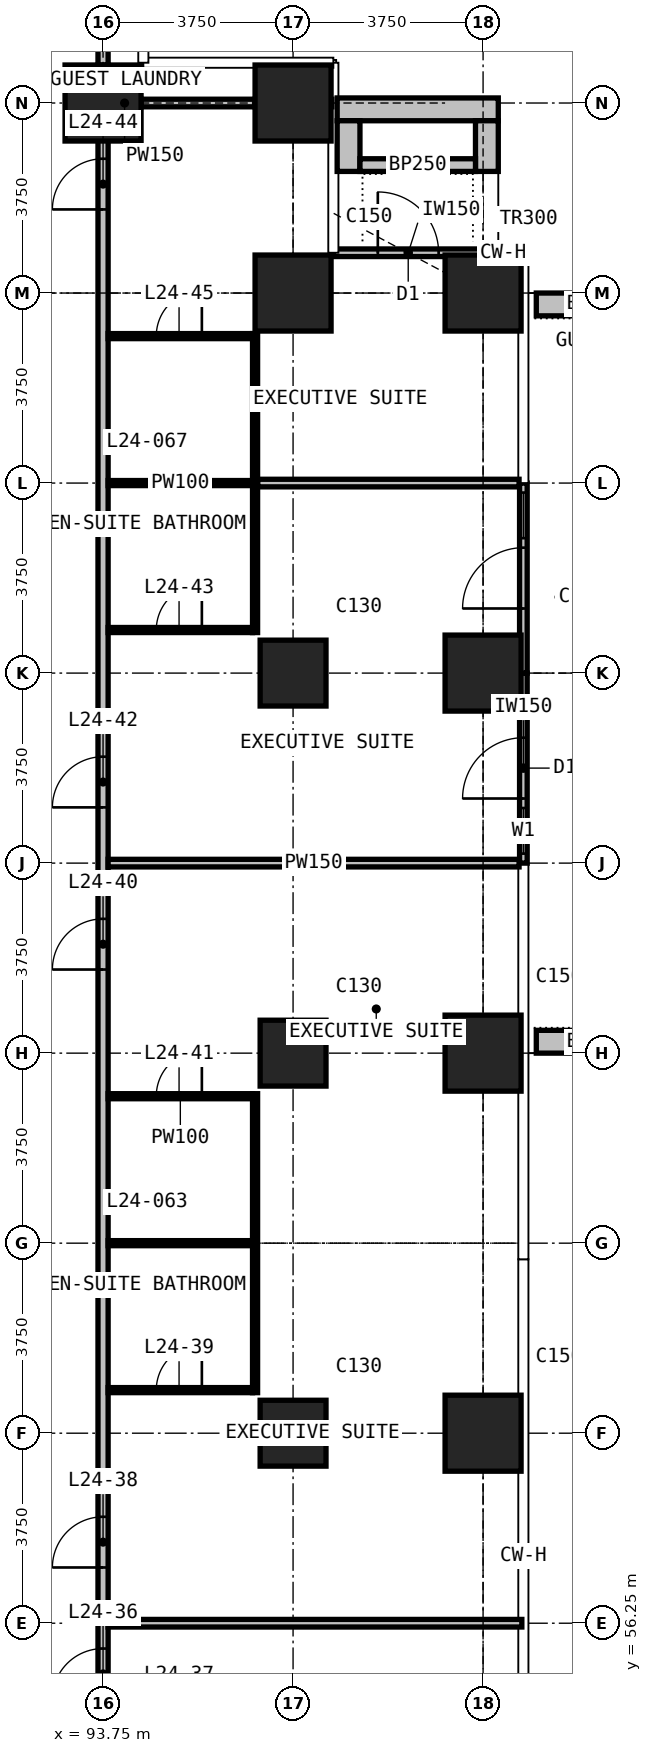
"""IFC4 building model, lengths in metres.
Left out: names, types, materials, properties, quantities, classifications, styles, units other than length and angle.
Written with IfcOpenShell. Run it as: python <this file> out.ifc"""

import sys

from ifc_helpers import new_model, si_unit, direction, frame, frame_2d, origin, origin_2d, place, context, subcontext, project, spatial, rectangle, extrude, element, fill, save


model = new_model("IFC4")
c1 = context("Model", 3, precision=1e-05, world=origin(), true_north=direction((0.0, 1.0)))
c2 = subcontext(c1, "Body", "Model", "MODEL_VIEW")
j1 = project(units=[si_unit("LENGTHUNIT", "METRE"), si_unit("PLANEANGLEUNIT", "RADIAN")], contexts=[c1])
p1 = place(None, origin())
s1 = spatial("IfcSite", under=j1, at=p1, CompositionType="ELEMENT")
p2 = place(p1, origin())
s2 = spatial("IfcBuilding", under=s1, at=p2, CompositionType="ELEMENT")
p3 = place(p2, frame((0.0, 0.0, 98.9)))
s3 = spatial("IfcBuildingStorey", under=s2, at=p3, CompositionType="ELEMENT", Elevation=98.9)
p4 = place(p3, frame((93.75, 86.25, 0.0), z_axis=(0.0, 0.0, 1.0), x_axis=(1.0, 0.0, 0.0)))
e1 = element("IfcColumn", 1, at=p4, inside=s3, PredefinedType="COLUMN", context=c2, shape_type="SweptSolid", body=[
    extrude(rectangle(XDim=1.5, YDim=1.5, at=origin_2d()), origin(), (0.0, 0.0, 1.0), 3.3),
])
for number, where, z_axis, x_axis in (
    (2, (97.5, 60.0, 0.0), (0.0, 0.0, 1.0), (1.0, 0.0, 0.0)),
    (3, (97.5, 67.5, 0.0), (0.0, 0.0, 1.0), (1.0, 0.0, 0.0)),
    (4, (97.5, 75.0, 0.0), (0.0, 0.0, 1.0), (1.0, 0.0, 0.0)),
):
    element("IfcColumn", number, at=place(p3, frame(where, z_axis=z_axis, x_axis=x_axis)), inside=s3, PredefinedType="COLUMN", context=c2, shape_type="SweptSolid", body=[
        extrude(rectangle(XDim=1.3, YDim=1.3, at=origin_2d()), origin(), (0.0, 0.0, 1.0), 3.3),
    ])
for number, where, z_axis, x_axis in (
    (5, (97.5, 82.5, 0.0), (0.0, 0.0, 1.0), (1.0, 0.0, 0.0)),
    (6, (97.5, 86.25, 0.0), (0.0, 0.0, 1.0), (1.0, 0.0, 0.0)),
    (7, (101.25, 60.0, 0.0), (0.0, 0.0, 1.0), (1.0, 0.0, 0.0)),
    (8, (101.25, 67.5, 0.0), (0.0, 0.0, 1.0), (1.0, 0.0, 0.0)),
    (9, (101.25, 75.0, 0.0), (0.0, 0.0, 1.0), (1.0, 0.0, 0.0)),
    (10, (101.25, 82.5, 0.0), (0.0, 0.0, 1.0), (1.0, 0.0, 0.0)),
):
    element("IfcColumn", number, at=place(p3, frame(where, z_axis=z_axis, x_axis=x_axis)), inside=s3, PredefinedType="COLUMN", context=c2, shape_type="SweptSolid", body=[
        extrude(rectangle(XDim=1.5, YDim=1.5, at=origin_2d()), origin(), (0.0, 0.0, 1.0), 3.3),
    ])
p5 = place(p3, frame((102.045, 71.25, 0.0), z_axis=(0.0, 0.0, 1.0), x_axis=(0.0, 1.0, 0.0)))
e11 = element("IfcWall", 11, at=p5, inside=s3, PredefinedType="SOLIDWALL", context=c2, shape_type="SweptSolid", body=[
    extrude(rectangle(XDim=3.75, YDim=0.15, at=frame_2d((1.875, 0.0))), origin(), (0.0, 0.0, 1.0), 2.95),
])
p6 = place(p5, frame((0.188, 0.0, 0.1)))
e12 = element("IfcOpeningElement", 12, at=p6, cuts=e11, PredefinedType="OPENING", context=c2, shape_type="SweptSolid", body=[
    extrude(rectangle(XDim=0.9, YDim=2.4, at=frame_2d((0.45, 1.2))), frame((0.0, 0.085, 0.0), z_axis=(0.0, -1.0, 0.0), x_axis=(1.0, 0.0, 0.0)), (0.0, 0.0, 1.0), 0.17),
])
p7 = place(p5, frame((1.275, 0.0, 0.0)))
e13 = element("IfcOpeningElement", 13, at=p7, cuts=e11, PredefinedType="OPENING", context=c2, shape_type="SweptSolid", body=[
    extrude(rectangle(XDim=1.2, YDim=2.4, at=frame_2d((0.6, 1.2))), frame((0.0, 0.085, 0.0), z_axis=(0.0, -1.0, 0.0), x_axis=(1.0, 0.0, 0.0)), (0.0, 0.0, 1.0), 0.17),
])
p8 = place(p3, frame((102.045, 75.0, 0.0), z_axis=(0.0, 0.0, 1.0), x_axis=(0.0, 1.0, 0.0)))
e14 = element("IfcWall", 14, at=p8, inside=s3, PredefinedType="SOLIDWALL", context=c2, shape_type="SweptSolid", body=[
    extrude(rectangle(XDim=3.75, YDim=0.15, at=frame_2d((1.875, 0.0))), origin(), (0.0, 0.0, 1.0), 2.95),
])
p9 = place(p8, frame((1.275, 0.0, 0.0)))
e15 = element("IfcOpeningElement", 15, at=p9, cuts=e14, PredefinedType="OPENING", context=c2, shape_type="SweptSolid", body=[
    extrude(rectangle(XDim=1.2, YDim=2.4, at=frame_2d((0.6, 1.2))), frame((0.0, 0.085, 0.0), z_axis=(0.0, -1.0, 0.0), x_axis=(1.0, 0.0, 0.0)), (0.0, 0.0, 1.0), 0.17),
])
p10 = place(p8, frame((2.663, 0.0, 0.1)))
e16 = element("IfcOpeningElement", 16, at=p10, cuts=e14, PredefinedType="OPENING", context=c2, shape_type="SweptSolid", body=[
    extrude(rectangle(XDim=0.9, YDim=2.4, at=frame_2d((0.45, 1.2))), frame((0.0, 0.085, 0.0), z_axis=(0.0, -1.0, 0.0), x_axis=(1.0, 0.0, 0.0)), (0.0, 0.0, 1.0), 0.17),
])
p11 = place(p3, frame((98.295, 83.295, 0.0), z_axis=(0.0, 0.0, 1.0), x_axis=(1.0, 0.0, 0.0)))
e17 = element("IfcWall", 17, at=p11, inside=s3, PredefinedType="SOLIDWALL", context=c2, shape_type="SweptSolid", body=[
    extrude(rectangle(XDim=2.955, YDim=0.15, at=frame_2d((1.478, 0.0))), origin(), (0.0, 0.0, 1.0), 2.95),
])
p12 = place(p11, frame((0.877, 0.0, 0.0)))
e18 = element("IfcOpeningElement", 18, at=p12, cuts=e17, PredefinedType="OPENING", context=c2, shape_type="SweptSolid", body=[
    extrude(rectangle(XDim=1.2, YDim=2.4, at=frame_2d((0.6, 1.2))), frame((0.0, 0.085, 0.0), z_axis=(0.0, -1.0, 0.0), x_axis=(1.0, 0.0, 0.0)), (0.0, 0.0, 1.0), 0.17),
])
for number, where, z_axis, x_axis in (
    (19, (102.3, 67.725, 0.0), (0.0, 0.0, 1.0), (1.0, 0.0, 0.0)),
    (20, (102.3, 82.275, 0.0), (0.0, 0.0, 1.0), (1.0, 0.0, 0.0)),
):
    element("IfcWall", number, at=place(p3, frame(where, z_axis=z_axis, x_axis=x_axis)), inside=s3, PredefinedType="USERDEFINED", context=c2, shape_type="SweptSolid", body=[
        extrude(rectangle(XDim=2.35, YDim=0.45, at=frame_2d((1.175, 0.0))), origin(), (0.0, 0.0, 1.0), 1.1),
    ])
p13 = place(p3, frame((98.37, 86.125, 0.0), z_axis=(0.0, 0.0, 1.0), x_axis=(1.0, 0.0, 0.0)))
e21 = element("IfcWall", 21, at=p13, inside=s3, PredefinedType="USERDEFINED", context=c2, shape_type="SweptSolid", body=[
    extrude(rectangle(XDim=3.18, YDim=0.45, at=frame_2d((1.59, 0.0))), origin(), (0.0, 0.0, 1.0), 1.1),
])
for number, where, z_axis, x_axis in (
    (22, (98.595, 84.9, 0.0), (0.0, 0.0, 1.0), (0.0, 1.0, 0.0)),
    (23, (101.325, 84.9, 0.0), (0.0, 0.0, 1.0), (0.0, 1.0, 0.0)),
):
    element("IfcWall", number, at=place(p3, frame(where, z_axis=z_axis, x_axis=x_axis)), inside=s3, PredefinedType="USERDEFINED", context=c2, shape_type="SweptSolid", body=[
        extrude(rectangle(XDim=1.0, YDim=0.45, at=frame_2d((0.5, 0.0))), origin(), (0.0, 0.0, 1.0), 1.1),
    ])
p14 = place(p3, frame((98.82, 85.025, 0.0), z_axis=(0.0, 0.0, 1.0), x_axis=(1.0, 0.0, 0.0)))
e24 = element("IfcWall", 24, at=p14, inside=s3, PredefinedType="USERDEFINED", context=c2, shape_type="SweptSolid", body=[
    extrude(rectangle(XDim=2.28, YDim=0.25, at=frame_2d((1.14, 0.0))), origin(), (0.0, 0.0, 1.0), 1.0),
])
p15 = place(p3, frame((93.75, 52.4, 0.0), z_axis=(0.0, 0.0, 1.0), x_axis=(0.0, 1.0, 0.0)))
e25 = element("IfcWall", 25, at=p15, inside=s3, PredefinedType="PARTITIONING", context=c2, shape_type="SweptSolid", body=[
    extrude(rectangle(XDim=34.6, YDim=0.2, at=frame_2d((17.3, 0.0))), origin(), (0.0, 0.0, 1.0), 2.95),
])
p16 = place(p15, frame((2.35, 0.0, 0.0)))
e26 = element("IfcOpeningElement", 26, at=p16, cuts=e25, PredefinedType="OPENING", context=c2, shape_type="SweptSolid", body=[
    extrude(rectangle(XDim=1.0, YDim=2.1, at=frame_2d((0.5, 1.05))), frame((0.0, 0.11, 0.0), z_axis=(0.0, -1.0, 0.0), x_axis=(1.0, 0.0, 0.0)), (0.0, 0.0, 1.0), 0.22),
])
p17 = place(p15, frame((4.95, 0.0, 0.0)))
e27 = element("IfcOpeningElement", 27, at=p17, cuts=e25, PredefinedType="OPENING", context=c2, shape_type="SweptSolid", body=[
    extrude(rectangle(XDim=1.0, YDim=2.2, at=frame_2d((0.5, 1.1))), frame((0.0, 0.11, 0.0), z_axis=(0.0, -1.0, 0.0), x_axis=(1.0, 0.0, 0.0)), (0.0, 0.0, 1.0), 0.22),
])
p18 = place(p15, frame((16.75, 0.0, 0.0)))
e28 = element("IfcOpeningElement", 28, at=p18, cuts=e25, PredefinedType="OPENING", context=c2, shape_type="SweptSolid", body=[
    extrude(rectangle(XDim=1.0, YDim=2.2, at=frame_2d((0.5, 1.1))), frame((0.0, 0.11, 0.0), z_axis=(0.0, -1.0, 0.0), x_axis=(1.0, 0.0, 0.0)), (0.0, 0.0, 1.0), 0.22),
])
p19 = place(p15, frame((19.95, 0.0, 0.0)))
e29 = element("IfcOpeningElement", 29, at=p19, cuts=e25, PredefinedType="OPENING", context=c2, shape_type="SweptSolid", body=[
    extrude(rectangle(XDim=1.0, YDim=2.2, at=frame_2d((0.5, 1.1))), frame((0.0, 0.11, 0.0), z_axis=(0.0, -1.0, 0.0), x_axis=(1.0, 0.0, 0.0)), (0.0, 0.0, 1.0), 0.22),
])
p20 = place(p15, frame((31.75, 0.0, 0.0)))
e30 = element("IfcOpeningElement", 30, at=p20, cuts=e25, PredefinedType="OPENING", context=c2, shape_type="SweptSolid", body=[
    extrude(rectangle(XDim=1.0, YDim=2.2, at=frame_2d((0.5, 1.1))), frame((0.0, 0.11, 0.0), z_axis=(0.0, -1.0, 0.0), x_axis=(1.0, 0.0, 0.0)), (0.0, 0.0, 1.0), 0.22),
])
p21 = place(p3, frame((93.75, 87.0, 0.0), z_axis=(0.0, 0.0, 1.0), x_axis=(0.0, 1.0, 0.0)))
e31 = element("IfcWall", 31, at=p21, inside=s3, PredefinedType="PARTITIONING", context=c2, shape_type="SweptSolid", body=[
    extrude(rectangle(XDim=2.25, YDim=0.2, at=frame_2d((1.125, 0.0))), origin(), (0.0, 0.0, 1.0), 2.15),
])
p22 = place(p21, frame((1.05, 0.0, 0.0)))
e32 = element("IfcOpeningElement", 32, at=p22, cuts=e31, PredefinedType="OPENING", context=c2, shape_type="SweptSolid", body=[
    extrude(rectangle(XDim=0.9, YDim=2.1, at=frame_2d((0.45, 1.05))), frame((0.0, 0.11, 0.0), z_axis=(0.0, -1.0, 0.0), x_axis=(1.0, 0.0, 0.0)), (0.0, 0.0, 1.0), 0.22),
])
p23 = place(p3, frame((93.85, 56.25, 0.0), z_axis=(0.0, 0.0, 1.0), x_axis=(1.0, 0.0, 0.0)))
e33 = element("IfcWall", 33, at=p23, inside=s3, PredefinedType="PARTITIONING", context=c2, shape_type="SweptSolid", body=[
    extrude(rectangle(XDim=8.165, YDim=0.15, at=frame_2d((4.083, 0.0))), origin(), (0.0, 0.0, 1.0), 2.95),
])
p24 = place(p3, frame((93.85, 71.25, 0.0), z_axis=(0.0, 0.0, 1.0), x_axis=(1.0, 0.0, 0.0)))
e34 = element("IfcWall", 34, at=p24, inside=s3, PredefinedType="PARTITIONING", context=c2, shape_type="SweptSolid", body=[
    extrude(rectangle(XDim=8.11, YDim=0.15, at=frame_2d((4.055, 0.0))), origin(), (0.0, 0.0, 1.0), 2.95),
])
p25 = place(p3, frame((96.8, 78.75, 0.0), z_axis=(0.0, 0.0, 1.0), x_axis=(1.0, 0.0, 0.0)))
e35 = element("IfcWall", 35, at=p25, inside=s3, PredefinedType="PARTITIONING", context=c2, shape_type="SweptSolid", body=[
    extrude(rectangle(XDim=5.16, YDim=0.15, at=frame_2d((2.58, 0.0))), origin(), (0.0, 0.0, 1.0), 2.95),
])
p26 = place(p3, frame((93.85, 86.25, 0.0), z_axis=(0.0, 0.0, 1.0), x_axis=(1.0, 0.0, 0.0)))
e36 = element("IfcWall", 36, at=p26, inside=s3, PredefinedType="PARTITIONING", context=c2, shape_type="SweptSolid", body=[
    extrude(rectangle(XDim=0.65, YDim=0.15, at=frame_2d((0.325, 0.0))), origin(), (0.0, 0.0, 1.0), 2.95),
])
p27 = place(p3, frame((94.5, 86.25, 0.0), z_axis=(0.0, 0.0, 1.0), x_axis=(1.0, 0.0, 0.0)))
e37 = element("IfcWall", 37, at=p27, inside=s3, PredefinedType="PARTITIONING", context=c2, shape_type="SweptSolid", body=[
    extrude(rectangle(XDim=2.251, YDim=0.15, at=frame_2d((1.125, 0.0))), origin(), (0.0, 0.0, 1.0), 2.15),
])
p28 = place(p3, frame((96.751, 86.25, 0.0), z_axis=(0.0, 0.0, 1.0), x_axis=(1.0, 0.0, 0.0)))
e38 = element("IfcWall", 38, at=p28, inside=s3, PredefinedType="PARTITIONING", context=c2, shape_type="SweptSolid", body=[
    extrude(rectangle(XDim=1.514, YDim=0.15, at=frame_2d((0.757, 0.0))), origin(), (0.0, 0.0, 1.0), 2.95),
])
p29 = place(p3, frame((93.85, 60.85, 0.0), z_axis=(0.0, 0.0, 1.0), x_axis=(1.0, 0.0, 0.0)))
e39 = element("IfcWall", 39, at=p29, inside=s3, PredefinedType="PARTITIONING", context=c2, shape_type="SweptSolid", body=[
    extrude(rectangle(XDim=2.85, YDim=0.1, at=frame_2d((1.425, 0.0))), origin(), (0.0, 0.0, 1.0), 2.95),
])
p30 = place(p29, frame((0.95, 0.0, 0.0)))
e40 = element("IfcOpeningElement", 40, at=p30, cuts=e39, PredefinedType="OPENING", context=c2, shape_type="SweptSolid", body=[
    extrude(rectangle(XDim=0.9, YDim=2.2, at=frame_2d((0.45, 1.1))), frame((0.0, 0.06, 0.0), z_axis=(0.0, -1.0, 0.0), x_axis=(1.0, 0.0, 0.0)), (0.0, 0.0, 1.0), 0.12),
])
p31 = place(p3, frame((93.85, 63.75, 0.0), z_axis=(0.0, 0.0, 1.0), x_axis=(1.0, 0.0, 0.0)))
e41 = element("IfcWall", 41, at=p31, inside=s3, PredefinedType="PARTITIONING", context=c2, shape_type="SweptSolid", body=[
    extrude(rectangle(XDim=2.85, YDim=0.1, at=frame_2d((1.425, 0.0))), origin(), (0.0, 0.0, 1.0), 2.95),
])
p32 = place(p3, frame((93.85, 66.65, 0.0), z_axis=(0.0, 0.0, 1.0), x_axis=(1.0, 0.0, 0.0)))
e42 = element("IfcWall", 42, at=p32, inside=s3, PredefinedType="PARTITIONING", context=c2, shape_type="SweptSolid", body=[
    extrude(rectangle(XDim=2.85, YDim=0.1, at=frame_2d((1.425, 0.0))), origin(), (0.0, 0.0, 1.0), 2.95),
])
p33 = place(p32, frame((0.95, 0.0, 0.0)))
e43 = element("IfcOpeningElement", 43, at=p33, cuts=e42, PredefinedType="OPENING", context=c2, shape_type="SweptSolid", body=[
    extrude(rectangle(XDim=0.9, YDim=2.2, at=frame_2d((0.45, 1.1))), frame((0.0, 0.06, 0.0), z_axis=(0.0, -1.0, 0.0), x_axis=(1.0, 0.0, 0.0)), (0.0, 0.0, 1.0), 0.12),
])
p34 = place(p3, frame((93.85, 75.85, 0.0), z_axis=(0.0, 0.0, 1.0), x_axis=(1.0, 0.0, 0.0)))
e44 = element("IfcWall", 44, at=p34, inside=s3, PredefinedType="PARTITIONING", context=c2, shape_type="SweptSolid", body=[
    extrude(rectangle(XDim=2.85, YDim=0.1, at=frame_2d((1.425, 0.0))), origin(), (0.0, 0.0, 1.0), 2.95),
])
p35 = place(p34, frame((0.95, 0.0, 0.0)))
e45 = element("IfcOpeningElement", 45, at=p35, cuts=e44, PredefinedType="OPENING", context=c2, shape_type="SweptSolid", body=[
    extrude(rectangle(XDim=0.9, YDim=2.2, at=frame_2d((0.45, 1.1))), frame((0.0, 0.06, 0.0), z_axis=(0.0, -1.0, 0.0), x_axis=(1.0, 0.0, 0.0)), (0.0, 0.0, 1.0), 0.12),
])
p36 = place(p3, frame((93.85, 78.75, 0.0), z_axis=(0.0, 0.0, 1.0), x_axis=(1.0, 0.0, 0.0)))
e46 = element("IfcWall", 46, at=p36, inside=s3, PredefinedType="PARTITIONING", context=c2, shape_type="SweptSolid", body=[
    extrude(rectangle(XDim=2.85, YDim=0.1, at=frame_2d((1.425, 0.0))), origin(), (0.0, 0.0, 1.0), 2.95),
])
p37 = place(p3, frame((93.85, 81.65, 0.0), z_axis=(0.0, 0.0, 1.0), x_axis=(1.0, 0.0, 0.0)))
e47 = element("IfcWall", 47, at=p37, inside=s3, PredefinedType="PARTITIONING", context=c2, shape_type="SweptSolid", body=[
    extrude(rectangle(XDim=2.85, YDim=0.1, at=frame_2d((1.425, 0.0))), origin(), (0.0, 0.0, 1.0), 2.95),
])
p38 = place(p37, frame((0.95, 0.0, 0.0)))
e48 = element("IfcOpeningElement", 48, at=p38, cuts=e47, PredefinedType="OPENING", context=c2, shape_type="SweptSolid", body=[
    extrude(rectangle(XDim=0.9, YDim=2.2, at=frame_2d((0.45, 1.1))), frame((0.0, 0.06, 0.0), z_axis=(0.0, -1.0, 0.0), x_axis=(1.0, 0.0, 0.0)), (0.0, 0.0, 1.0), 0.12),
])
for number, where, z_axis, x_axis in (
    (49, (96.75, 60.8, 0.0), (0.0, 0.0, 1.0), (0.0, 1.0, 0.0)),
    (50, (96.75, 75.8, 0.0), (0.0, 0.0, 1.0), (0.0, 1.0, 0.0)),
):
    element("IfcWall", number, at=place(p3, frame(where, z_axis=z_axis, x_axis=x_axis)), inside=s3, PredefinedType="PARTITIONING", context=c2, shape_type="SweptSolid", body=[
        extrude(rectangle(XDim=5.9, YDim=0.1, at=frame_2d((2.95, 0.0))), origin(), (0.0, 0.0, 1.0), 2.95),
    ])
p39 = place(p6, origin())
e51 = element("IfcWindow", 51, at=p39, inside=s3, PartitioningType="SINGLE_PANEL", PredefinedType="WINDOW", context=c2, shape_type="SweptSolid", body=[
    extrude(rectangle(XDim=0.9, YDim=2.4, at=frame_2d((0.45, 1.2))), frame((0.0, 0.03, 0.0), z_axis=(0.0, -1.0, 0.0), x_axis=(1.0, 0.0, 0.0)), (0.0, 0.0, 1.0), 0.06),
])
fill(e12, e51)
p40 = place(p7, origin())
e52 = element("IfcDoor", 52, at=p40, inside=s3, OperationType="SINGLE_SWING_LEFT", PredefinedType="DOOR", context=c2, shape_type="SweptSolid", body=[
    extrude(rectangle(XDim=1.2, YDim=2.4, at=frame_2d((0.6, 1.2))), frame((0.0, 0.025, 0.0), z_axis=(0.0, -1.0, 0.0), x_axis=(1.0, 0.0, 0.0)), (0.0, 0.0, 1.0), 0.05),
])
fill(e13, e52)
p41 = place(p9, origin())
e53 = element("IfcDoor", 53, at=p41, inside=s3, OperationType="SINGLE_SWING_LEFT", PredefinedType="DOOR", context=c2, shape_type="SweptSolid", body=[
    extrude(rectangle(XDim=1.2, YDim=2.4, at=frame_2d((0.6, 1.2))), frame((0.0, 0.025, 0.0), z_axis=(0.0, -1.0, 0.0), x_axis=(1.0, 0.0, 0.0)), (0.0, 0.0, 1.0), 0.05),
])
fill(e15, e53)
p42 = place(p10, origin())
e54 = element("IfcWindow", 54, at=p42, inside=s3, PartitioningType="SINGLE_PANEL", PredefinedType="WINDOW", context=c2, shape_type="SweptSolid", body=[
    extrude(rectangle(XDim=0.9, YDim=2.4, at=frame_2d((0.45, 1.2))), frame((0.0, 0.03, 0.0), z_axis=(0.0, -1.0, 0.0), x_axis=(1.0, 0.0, 0.0)), (0.0, 0.0, 1.0), 0.06),
])
fill(e16, e54)
p43 = place(p12, origin())
e55 = element("IfcDoor", 55, at=p43, inside=s3, OperationType="SINGLE_SWING_LEFT", PredefinedType="DOOR", context=c2, shape_type="SweptSolid", body=[
    extrude(rectangle(XDim=1.2, YDim=2.4, at=frame_2d((0.6, 1.2))), frame((0.0, 0.025, 0.0), z_axis=(0.0, -1.0, 0.0), x_axis=(1.0, 0.0, 0.0)), (0.0, 0.0, 1.0), 0.05),
])
fill(e18, e55)
p44 = place(p16, origin())
e56 = element("IfcDoor", 56, at=p44, inside=s3, OperationType="SINGLE_SWING_LEFT", PredefinedType="DOOR", context=c2, shape_type="SweptSolid", body=[
    extrude(rectangle(XDim=1.0, YDim=2.1, at=frame_2d((0.5, 1.05))), frame((0.0, 0.025, 0.0), z_axis=(0.0, -1.0, 0.0), x_axis=(1.0, 0.0, 0.0)), (0.0, 0.0, 1.0), 0.05),
])
fill(e26, e56)
p45 = place(p17, origin())
e57 = element("IfcDoor", 57, at=p45, inside=s3, OperationType="SINGLE_SWING_LEFT", PredefinedType="DOOR", context=c2, shape_type="SweptSolid", body=[
    extrude(rectangle(XDim=1.0, YDim=2.2, at=frame_2d((0.5, 1.1))), frame((0.0, 0.025, 0.0), z_axis=(0.0, -1.0, 0.0), x_axis=(1.0, 0.0, 0.0)), (0.0, 0.0, 1.0), 0.05),
])
fill(e27, e57)
p46 = place(p30, origin())
e58 = element("IfcDoor", 58, at=p46, inside=s3, OperationType="SINGLE_SWING_RIGHT", PredefinedType="DOOR", context=c2, shape_type="SweptSolid", body=[
    extrude(rectangle(XDim=0.9, YDim=2.2, at=frame_2d((0.45, 1.1))), frame((0.0, 0.025, 0.0), z_axis=(0.0, -1.0, 0.0), x_axis=(1.0, 0.0, 0.0)), (0.0, 0.0, 1.0), 0.05),
])
fill(e40, e58)
p47 = place(p18, origin())
e59 = element("IfcDoor", 59, at=p47, inside=s3, OperationType="SINGLE_SWING_RIGHT", PredefinedType="DOOR", context=c2, shape_type="SweptSolid", body=[
    extrude(rectangle(XDim=1.0, YDim=2.2, at=frame_2d((0.5, 1.1))), frame((0.0, 0.025, 0.0), z_axis=(0.0, -1.0, 0.0), x_axis=(1.0, 0.0, 0.0)), (0.0, 0.0, 1.0), 0.05),
])
fill(e28, e59)
p48 = place(p33, origin())
e60 = element("IfcDoor", 60, at=p48, inside=s3, OperationType="SINGLE_SWING_RIGHT", PredefinedType="DOOR", context=c2, shape_type="SweptSolid", body=[
    extrude(rectangle(XDim=0.9, YDim=2.2, at=frame_2d((0.45, 1.1))), frame((0.0, 0.025, 0.0), z_axis=(0.0, -1.0, 0.0), x_axis=(1.0, 0.0, 0.0)), (0.0, 0.0, 1.0), 0.05),
])
fill(e43, e60)
p49 = place(p19, origin())
e61 = element("IfcDoor", 61, at=p49, inside=s3, OperationType="SINGLE_SWING_RIGHT", PredefinedType="DOOR", context=c2, shape_type="SweptSolid", body=[
    extrude(rectangle(XDim=1.0, YDim=2.2, at=frame_2d((0.5, 1.1))), frame((0.0, 0.025, 0.0), z_axis=(0.0, -1.0, 0.0), x_axis=(1.0, 0.0, 0.0)), (0.0, 0.0, 1.0), 0.05),
])
fill(e29, e61)
p50 = place(p35, origin())
e62 = element("IfcDoor", 62, at=p50, inside=s3, OperationType="SINGLE_SWING_RIGHT", PredefinedType="DOOR", context=c2, shape_type="SweptSolid", body=[
    extrude(rectangle(XDim=0.9, YDim=2.2, at=frame_2d((0.45, 1.1))), frame((0.0, 0.025, 0.0), z_axis=(0.0, -1.0, 0.0), x_axis=(1.0, 0.0, 0.0)), (0.0, 0.0, 1.0), 0.05),
])
fill(e45, e62)
p51 = place(p20, origin())
e63 = element("IfcDoor", 63, at=p51, inside=s3, OperationType="SINGLE_SWING_RIGHT", PredefinedType="DOOR", context=c2, shape_type="SweptSolid", body=[
    extrude(rectangle(XDim=1.0, YDim=2.2, at=frame_2d((0.5, 1.1))), frame((0.0, 0.025, 0.0), z_axis=(0.0, -1.0, 0.0), x_axis=(1.0, 0.0, 0.0)), (0.0, 0.0, 1.0), 0.05),
])
fill(e30, e63)
p52 = place(p38, origin())
e64 = element("IfcDoor", 64, at=p52, inside=s3, OperationType="SINGLE_SWING_RIGHT", PredefinedType="DOOR", context=c2, shape_type="SweptSolid", body=[
    extrude(rectangle(XDim=0.9, YDim=2.2, at=frame_2d((0.45, 1.1))), frame((0.0, 0.025, 0.0), z_axis=(0.0, -1.0, 0.0), x_axis=(1.0, 0.0, 0.0)), (0.0, 0.0, 1.0), 0.05),
])
fill(e48, e64)
save(model, sys.argv[1])
